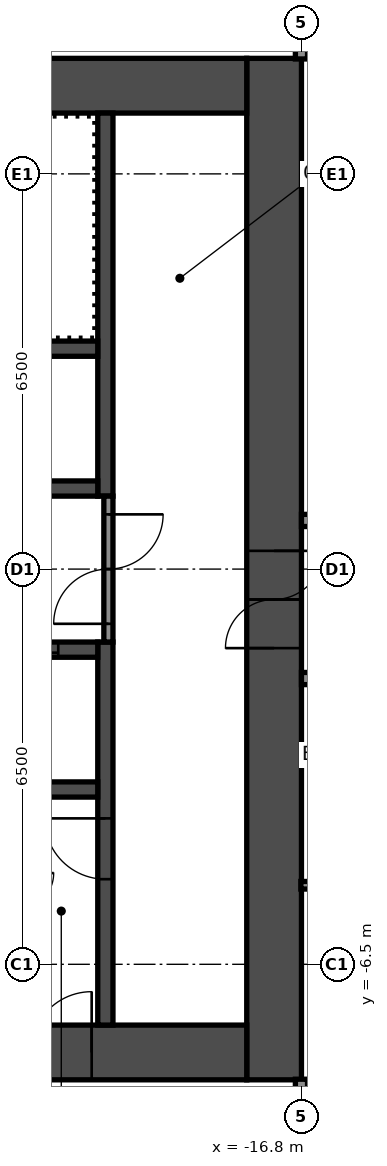
"""IFC4 building model, lengths in metres.
Left out: names, types, materials, properties, quantities, classifications, styles, units other than length and angle.
Written with IfcOpenShell. Run it as: python <this file> out.ifc"""

import sys

from ifc_helpers import new_model, si_unit, direction, frame, frame_2d, origin, place, context, subcontext, project, spatial, rectangle, extrude, element, fill, save


model = new_model("IFC4")
c1 = context("Model", 3, precision=1e-05, world=origin(), true_north=direction((0.0, 1.0)))
c2 = subcontext(c1, "Body", "Model", "MODEL_VIEW")
j1 = project(units=[si_unit("LENGTHUNIT", "METRE"), si_unit("PLANEANGLEUNIT", "RADIAN")], contexts=[c1])
p1 = place(None, origin())
s1 = spatial("IfcSite", under=j1, at=p1, CompositionType="ELEMENT")
p2 = place(p1, origin())
s2 = spatial("IfcBuilding", under=s1, at=p2, CompositionType="ELEMENT")
p3 = place(p2, frame((0.0, 0.0, 169.4)))
s3 = spatial("IfcBuildingStorey", under=s2, at=p3, CompositionType="ELEMENT", Elevation=169.4)
p4 = place(p3, frame((-17.25, -8.4, 0.0), z_axis=(0.0, 0.0, 1.0), x_axis=(0.0, 1.0, 0.0)))
e1 = element("IfcWall", 1, at=p4, inside=s3, PredefinedType="SHEAR", context=c2, shape_type="SweptSolid", body=[
    extrude(rectangle(XDim=16.8, YDim=0.9, at=frame_2d((8.4, 0.0))), origin(), (0.0, 0.0, 1.0), 2.75),
])
p5 = place(p4, frame((7.1, 0.0, 0.0)))
e2 = element("IfcOpeningElement", 2, at=p5, cuts=e1, PredefinedType="OPENING", context=c2, shape_type="SweptSolid", body=[
    extrude(rectangle(XDim=1.6, YDim=2.1, at=frame_2d((0.8, 1.05))), frame((0.0, 0.46, 0.0), z_axis=(0.0, -1.0, 0.0), x_axis=(1.0, 0.0, 0.0)), (0.0, 0.0, 1.0), 0.92),
])
p6 = place(p3, frame((-32.7, 7.95, 0.0), z_axis=(0.0, 0.0, 1.0), x_axis=(1.0, 0.0, 0.0)))
e3 = element("IfcWall", 3, at=p6, inside=s3, PredefinedType="SHEAR", context=c2, shape_type="SweptSolid", body=[
    extrude(rectangle(XDim=15.0, YDim=0.9, at=frame_2d((7.5, 0.0))), origin(), (0.0, 0.0, 1.0), 2.75),
])
p7 = place(p6, frame((3.4, 0.0, 0.0)))
e4 = element("IfcOpeningElement", 4, at=p7, cuts=e3, PredefinedType="OPENING", context=c2, shape_type="SweptSolid", body=[
    extrude(rectangle(XDim=1.2, YDim=2.1, at=frame_2d((0.6, 1.05))), frame((0.0, 0.46, 0.0), z_axis=(0.0, -1.0, 0.0), x_axis=(1.0, 0.0, 0.0)), (0.0, 0.0, 1.0), 0.92),
])
p8 = place(p6, frame((0.75, 0.0, 0.0)))
e5 = element("IfcOpeningElement", 5, at=p8, cuts=e3, PredefinedType="OPENING", context=c2, shape_type="SweptSolid", body=[
    extrude(rectangle(XDim=0.9, YDim=2.1, at=frame_2d((0.45, 1.05))), frame((0.0, 0.46, 0.0), z_axis=(0.0, -1.0, 0.0), x_axis=(1.0, 0.0, 0.0)), (0.0, 0.0, 1.0), 0.92),
])
p9 = place(p3, frame((-32.7, -7.95, 0.0), z_axis=(0.0, 0.0, 1.0), x_axis=(1.0, 0.0, 0.0)))
e6 = element("IfcWall", 6, at=p9, inside=s3, PredefinedType="SHEAR", context=c2, shape_type="SweptSolid", body=[
    extrude(rectangle(XDim=15.0, YDim=0.9, at=frame_2d((7.5, 0.0))), origin(), (0.0, 0.0, 1.0), 2.75),
])
p10 = place(p9, frame((11.45, 0.0, 0.0)))
e7 = element("IfcOpeningElement", 7, at=p10, cuts=e6, PredefinedType="OPENING", context=c2, shape_type="SweptSolid", body=[
    extrude(rectangle(XDim=1.0, YDim=2.1, at=frame_2d((0.5, 1.05))), frame((0.0, 0.46, 0.0), z_axis=(0.0, -1.0, 0.0), x_axis=(1.0, 0.0, 0.0)), (0.0, 0.0, 1.0), 0.92),
])
p11 = place(p3, frame((-20.025, 1.2, 0.0), z_axis=(0.0, 0.0, 1.0), x_axis=(0.0, 1.0, 0.0)))
e8 = element("IfcWall", 8, at=p11, inside=s3, PredefinedType="SHEAR", context=c2, shape_type="SweptSolid", body=[
    extrude(rectangle(XDim=6.3, YDim=0.25, at=frame_2d((3.15, 0.0))), origin(), (0.0, 0.0, 1.0), 2.75),
])
p12 = place(p3, frame((-20.025, -7.5, 0.0), z_axis=(0.0, 0.0, 1.0), x_axis=(0.0, 1.0, 0.0)))
e9 = element("IfcWall", 9, at=p12, inside=s3, PredefinedType="SHEAR", context=c2, shape_type="SweptSolid", body=[
    extrude(rectangle(XDim=6.3, YDim=0.25, at=frame_2d((3.15, 0.0))), origin(), (0.0, 0.0, 1.0), 2.75),
])
p13 = place(p12, frame((2.4, 0.0, 0.0)))
e10 = element("IfcOpeningElement", 10, at=p13, cuts=e9, PredefinedType="OPENING", context=c2, shape_type="SweptSolid", body=[
    extrude(rectangle(XDim=1.0, YDim=2.1, at=frame_2d((0.5, 1.05))), frame((0.0, 0.135, 0.0), z_axis=(0.0, -1.0, 0.0), x_axis=(1.0, 0.0, 0.0)), (0.0, 0.0, 1.0), 0.27),
])
p14 = place(p3, frame((-27.65, 1.325, 0.0), z_axis=(0.0, 0.0, 1.0), x_axis=(1.0, 0.0, 0.0)))
e11 = element("IfcWall", 11, at=p14, inside=s3, PredefinedType="SHEAR", context=c2, shape_type="SweptSolid", body=[
    extrude(rectangle(XDim=7.5, YDim=0.25, at=frame_2d((3.75, 0.0))), origin(), (0.0, 0.0, 1.0), 2.75),
])
p15 = place(p14, frame((4.363, 0.0, 0.0)))
e12 = element("IfcOpeningElement", 12, at=p15, cuts=e11, PredefinedType="OPENING", context=c2, shape_type="SweptSolid", body=[
    extrude(rectangle(XDim=0.9, YDim=2.1, at=frame_2d((0.45, 1.05))), frame((0.0, 0.135, 0.0), z_axis=(0.0, -1.0, 0.0), x_axis=(1.0, 0.0, 0.0)), (0.0, 0.0, 1.0), 0.27),
])
p16 = place(p14, frame((0.663, 0.0, 0.0)))
e13 = element("IfcOpeningElement", 13, at=p16, cuts=e11, PredefinedType="OPENING", context=c2, shape_type="SweptSolid", body=[
    extrude(rectangle(XDim=0.9, YDim=2.1, at=frame_2d((0.45, 1.05))), frame((0.0, 0.135, 0.0), z_axis=(0.0, -1.0, 0.0), x_axis=(1.0, 0.0, 0.0)), (0.0, 0.0, 1.0), 0.27),
])
p17 = place(p3, frame((-27.65, 3.625, 0.0), z_axis=(0.0, 0.0, 1.0), x_axis=(1.0, 0.0, 0.0)))
e14 = element("IfcWall", 14, at=p17, inside=s3, PredefinedType="SHEAR", context=c2, shape_type="SweptSolid", body=[
    extrude(rectangle(XDim=7.5, YDim=0.25, at=frame_2d((3.75, 0.0))), origin(), (0.0, 0.0, 1.0), 2.75),
])
p18 = place(p3, frame((-27.65, -1.325, 0.0), z_axis=(0.0, 0.0, 1.0), x_axis=(1.0, 0.0, 0.0)))
e15 = element("IfcWall", 15, at=p18, inside=s3, PredefinedType="SHEAR", context=c2, shape_type="SweptSolid", body=[
    extrude(rectangle(XDim=7.5, YDim=0.25, at=frame_2d((3.75, 0.0))), origin(), (0.0, 0.0, 1.0), 2.75),
])
p19 = place(p18, frame((5.75, 0.0, 0.0)))
e16 = element("IfcOpeningElement", 16, at=p19, cuts=e15, PredefinedType="OPENING", context=c2, shape_type="SweptSolid", body=[
    extrude(rectangle(XDim=1.1, YDim=2.1, at=frame_2d((0.55, 1.05))), frame((0.0, 0.135, 0.0), z_axis=(0.0, -1.0, 0.0), x_axis=(1.0, 0.0, 0.0)), (0.0, 0.0, 1.0), 0.27),
])
p20 = place(p18, frame((3.35, 0.0, 0.0)))
e17 = element("IfcOpeningElement", 17, at=p20, cuts=e15, PredefinedType="OPENING", context=c2, shape_type="SweptSolid", body=[
    extrude(rectangle(XDim=1.1, YDim=2.1, at=frame_2d((0.55, 1.05))), frame((0.0, 0.135, 0.0), z_axis=(0.0, -1.0, 0.0), x_axis=(1.0, 0.0, 0.0)), (0.0, 0.0, 1.0), 0.27),
])
p21 = place(p18, frame((0.95, 0.0, 0.0)))
e18 = element("IfcOpeningElement", 18, at=p21, cuts=e15, PredefinedType="OPENING", context=c2, shape_type="SweptSolid", body=[
    extrude(rectangle(XDim=1.1, YDim=2.1, at=frame_2d((0.55, 1.05))), frame((0.0, 0.135, 0.0), z_axis=(0.0, -1.0, 0.0), x_axis=(1.0, 0.0, 0.0)), (0.0, 0.0, 1.0), 0.27),
])
p22 = place(p3, frame((-27.65, -3.625, 0.0), z_axis=(0.0, 0.0, 1.0), x_axis=(1.0, 0.0, 0.0)))
e19 = element("IfcWall", 19, at=p22, inside=s3, PredefinedType="SHEAR", context=c2, shape_type="SweptSolid", body=[
    extrude(rectangle(XDim=7.5, YDim=0.25, at=frame_2d((3.75, 0.0))), origin(), (0.0, 0.0, 1.0), 2.75),
])
p23 = place(p3, frame((-19.975, -1.2, 0.0), z_axis=(0.0, 0.0, 1.0), x_axis=(0.0, 1.0, 0.0)))
e20 = element("IfcWall", 20, at=p23, inside=s3, PredefinedType="PARTITIONING", context=c2, shape_type="SweptSolid", body=[
    extrude(rectangle(XDim=2.4, YDim=0.15, at=frame_2d((1.2, 0.0))), origin(), (0.0, 0.0, 1.0), 2.75),
])
p24 = place(p23, frame((0.3, 0.0, 0.0)))
e21 = element("IfcOpeningElement", 21, at=p24, cuts=e20, PredefinedType="OPENING", context=c2, shape_type="SweptSolid", body=[
    extrude(rectangle(XDim=1.8, YDim=2.1, at=frame_2d((0.9, 1.05))), frame((0.0, 0.085, 0.0), z_axis=(0.0, -1.0, 0.0), x_axis=(1.0, 0.0, 0.0)), (0.0, 0.0, 1.0), 0.17),
])
p25 = place(p3, frame((-16.81, -5.2, 0.0), z_axis=(0.0, 0.0, 1.0), x_axis=(1.0, 0.0, 0.0)))
e22 = element("IfcWall", 22, at=p25, inside=s3, PredefinedType="PARTITIONING", context=c2, shape_type="SweptSolid", body=[
    extrude(rectangle(XDim=3.348, YDim=0.125, at=frame_2d((1.674, 0.0))), origin(), (0.0, 0.0, 1.0), 2.75),
])
p26 = place(p25, frame((1.31, 0.0, 0.0)))
e23 = element("IfcOpeningElement", 23, at=p26, cuts=e22, PredefinedType="OPENING", context=c2, shape_type="SweptSolid", body=[
    extrude(rectangle(XDim=0.8, YDim=2.1, at=frame_2d((0.4, 1.05))), frame((0.0, 0.073, 0.0), z_axis=(0.0, -1.0, 0.0), x_axis=(1.0, 0.0, 0.0)), (0.0, 0.0, 1.0), 0.145),
])
p27 = place(p3, frame((-16.8, -1.8, 0.0), z_axis=(0.0, 0.0, 1.0), x_axis=(1.0, 0.0, 0.0)))
e24 = element("IfcWall", 24, at=p27, inside=s3, PredefinedType="PARTITIONING", context=c2, shape_type="SweptSolid", body=[
    extrude(rectangle(XDim=33.6, YDim=0.2, at=frame_2d((16.8, 0.0))), origin(), (0.0, 0.0, 1.0), 2.75),
])
p28 = place(p27, frame((5.4, 0.0, 0.0)))
e25 = element("IfcOpeningElement", 25, at=p28, cuts=e24, PredefinedType="OPENING", context=c2, shape_type="SweptSolid", body=[
    extrude(rectangle(XDim=1.0, YDim=2.1, at=frame_2d((0.5, 1.05))), frame((0.0, 0.11, 0.0), z_axis=(0.0, -1.0, 0.0), x_axis=(1.0, 0.0, 0.0)), (0.0, 0.0, 1.0), 0.22),
])
p29 = place(p27, frame((11.25, 0.0, 0.0)))
e26 = element("IfcOpeningElement", 26, at=p29, cuts=e24, PredefinedType="OPENING", context=c2, shape_type="SweptSolid", body=[
    extrude(rectangle(XDim=1.0, YDim=2.1, at=frame_2d((0.5, 1.05))), frame((0.0, 0.11, 0.0), z_axis=(0.0, -1.0, 0.0), x_axis=(1.0, 0.0, 0.0)), (0.0, 0.0, 1.0), 0.22),
])
p30 = place(p27, frame((12.95, 0.0, 0.0)))
e27 = element("IfcOpeningElement", 27, at=p30, cuts=e24, PredefinedType="OPENING", context=c2, shape_type="SweptSolid", body=[
    extrude(rectangle(XDim=1.0, YDim=2.1, at=frame_2d((0.5, 1.05))), frame((0.0, 0.11, 0.0), z_axis=(0.0, -1.0, 0.0), x_axis=(1.0, 0.0, 0.0)), (0.0, 0.0, 1.0), 0.22),
])
p31 = place(p27, frame((18.785, 0.0, 0.0)))
e28 = element("IfcOpeningElement", 28, at=p31, cuts=e24, PredefinedType="OPENING", context=c2, shape_type="SweptSolid", body=[
    extrude(rectangle(XDim=0.9, YDim=2.1, at=frame_2d((0.45, 1.05))), frame((0.0, 0.11, 0.0), z_axis=(0.0, -1.0, 0.0), x_axis=(1.0, 0.0, 0.0)), (0.0, 0.0, 1.0), 0.22),
])
p32 = place(p27, frame((22.985, 0.0, 0.0)))
e29 = element("IfcOpeningElement", 29, at=p32, cuts=e24, PredefinedType="OPENING", context=c2, shape_type="SweptSolid", body=[
    extrude(rectangle(XDim=0.9, YDim=2.1, at=frame_2d((0.45, 1.05))), frame((0.0, 0.11, 0.0), z_axis=(0.0, -1.0, 0.0), x_axis=(1.0, 0.0, 0.0)), (0.0, 0.0, 1.0), 0.22),
])
p33 = place(p27, frame((28.05, 0.0, 0.0)))
e30 = element("IfcOpeningElement", 30, at=p33, cuts=e24, PredefinedType="OPENING", context=c2, shape_type="SweptSolid", body=[
    extrude(rectangle(XDim=1.0, YDim=2.1, at=frame_2d((0.5, 1.05))), frame((0.0, 0.11, 0.0), z_axis=(0.0, -1.0, 0.0), x_axis=(1.0, 0.0, 0.0)), (0.0, 0.0, 1.0), 0.22),
])
p34 = place(p27, frame((29.75, 0.0, 0.0)))
e31 = element("IfcOpeningElement", 31, at=p34, cuts=e24, PredefinedType="OPENING", context=c2, shape_type="SweptSolid", body=[
    extrude(rectangle(XDim=1.0, YDim=2.1, at=frame_2d((0.5, 1.05))), frame((0.0, 0.11, 0.0), z_axis=(0.0, -1.0, 0.0), x_axis=(1.0, 0.0, 0.0)), (0.0, 0.0, 1.0), 0.22),
])
p35 = place(p3, frame((-16.8, 0.8, 0.0), z_axis=(0.0, 0.0, 1.0), x_axis=(1.0, 0.0, 0.0)))
e32 = element("IfcWall", 32, at=p35, inside=s3, PredefinedType="PARTITIONING", context=c2, shape_type="SweptSolid", body=[
    extrude(rectangle(XDim=33.6, YDim=0.2, at=frame_2d((16.8, 0.0))), origin(), (0.0, 0.0, 1.0), 2.75),
])
p36 = place(p35, frame((2.0, 0.0, 0.0)))
e33 = element("IfcOpeningElement", 33, at=p36, cuts=e32, PredefinedType="OPENING", context=c2, shape_type="SweptSolid", body=[
    extrude(rectangle(XDim=1.0, YDim=2.1, at=frame_2d((0.5, 1.05))), frame((0.0, 0.11, 0.0), z_axis=(0.0, -1.0, 0.0), x_axis=(1.0, 0.0, 0.0)), (0.0, 0.0, 1.0), 0.22),
])
p37 = place(p35, frame((11.25, 0.0, 0.0)))
e34 = element("IfcOpeningElement", 34, at=p37, cuts=e32, PredefinedType="OPENING", context=c2, shape_type="SweptSolid", body=[
    extrude(rectangle(XDim=1.0, YDim=2.1, at=frame_2d((0.5, 1.05))), frame((0.0, 0.11, 0.0), z_axis=(0.0, -1.0, 0.0), x_axis=(1.0, 0.0, 0.0)), (0.0, 0.0, 1.0), 0.22),
])
p38 = place(p35, frame((12.95, 0.0, 0.0)))
e35 = element("IfcOpeningElement", 35, at=p38, cuts=e32, PredefinedType="OPENING", context=c2, shape_type="SweptSolid", body=[
    extrude(rectangle(XDim=1.0, YDim=2.1, at=frame_2d((0.5, 1.05))), frame((0.0, 0.11, 0.0), z_axis=(0.0, -1.0, 0.0), x_axis=(1.0, 0.0, 0.0)), (0.0, 0.0, 1.0), 0.22),
])
p39 = place(p35, frame((19.04, 0.0, 0.0)))
e36 = element("IfcOpeningElement", 36, at=p39, cuts=e32, PredefinedType="OPENING", context=c2, shape_type="SweptSolid", body=[
    extrude(rectangle(XDim=0.9, YDim=2.1, at=frame_2d((0.45, 1.05))), frame((0.0, 0.11, 0.0), z_axis=(0.0, -1.0, 0.0), x_axis=(1.0, 0.0, 0.0)), (0.0, 0.0, 1.0), 0.22),
])
p40 = place(p35, frame((23.24, 0.0, 0.0)))
e37 = element("IfcOpeningElement", 37, at=p40, cuts=e32, PredefinedType="OPENING", context=c2, shape_type="SweptSolid", body=[
    extrude(rectangle(XDim=0.9, YDim=2.1, at=frame_2d((0.45, 1.05))), frame((0.0, 0.11, 0.0), z_axis=(0.0, -1.0, 0.0), x_axis=(1.0, 0.0, 0.0)), (0.0, 0.0, 1.0), 0.22),
])
p41 = place(p35, frame((28.05, 0.0, 0.0)))
e38 = element("IfcOpeningElement", 38, at=p41, cuts=e32, PredefinedType="OPENING", context=c2, shape_type="SweptSolid", body=[
    extrude(rectangle(XDim=1.0, YDim=2.1, at=frame_2d((0.5, 1.05))), frame((0.0, 0.11, 0.0), z_axis=(0.0, -1.0, 0.0), x_axis=(1.0, 0.0, 0.0)), (0.0, 0.0, 1.0), 0.22),
])
p42 = place(p35, frame((29.75, 0.0, 0.0)))
e39 = element("IfcOpeningElement", 39, at=p42, cuts=e32, PredefinedType="OPENING", context=c2, shape_type="SweptSolid", body=[
    extrude(rectangle(XDim=1.0, YDim=2.1, at=frame_2d((0.5, 1.05))), frame((0.0, 0.11, 0.0), z_axis=(0.0, -1.0, 0.0), x_axis=(1.0, 0.0, 0.0)), (0.0, 0.0, 1.0), 0.22),
])
p43 = place(p3, frame((-16.8, -19.3, 0.0), z_axis=(0.0, 0.0, 1.0), x_axis=(0.0, 1.0, 0.0)))
e40 = element("IfcWall", 40, at=p43, inside=s3, PredefinedType="PARTITIONING", context=c2, shape_type="SweptSolid", body=[
    extrude(rectangle(XDim=10.91, YDim=0.2, at=frame_2d((5.455, 0.0))), origin(), (0.0, 0.0, 1.0), 2.75),
])
p44 = place(p3, frame((-16.8, 8.39, 0.0), z_axis=(0.0, 0.0, 1.0), x_axis=(0.0, 1.0, 0.0)))
e41 = element("IfcWall", 41, at=p44, inside=s3, PredefinedType="PARTITIONING", context=c2, shape_type="SweptSolid", body=[
    extrude(rectangle(XDim=9.91, YDim=0.2, at=frame_2d((4.955, 0.0))), origin(), (0.0, 0.0, 1.0), 2.75),
])
p45 = place(p5, origin())
e42 = element("IfcDoor", 42, at=p45, inside=s3, OperationType="DOUBLE_DOOR_SINGLE_SWING", PredefinedType="DOOR", context=c2, shape_type="SweptSolid", body=[
    extrude(rectangle(XDim=1.6, YDim=2.1, at=frame_2d((0.8, 1.05))), frame((0.0, 0.025, 0.0), z_axis=(0.0, -1.0, 0.0), x_axis=(1.0, 0.0, 0.0)), (0.0, 0.0, 1.0), 0.05),
])
fill(e2, e42)
p46 = place(p10, origin())
e43 = element("IfcDoor", 43, at=p46, inside=s3, OperationType="SINGLE_SWING_LEFT", PredefinedType="DOOR", context=c2, shape_type="SweptSolid", body=[
    extrude(rectangle(XDim=1.0, YDim=2.1, at=frame_2d((0.5, 1.05))), frame((0.0, 0.025, 0.0), z_axis=(0.0, -1.0, 0.0), x_axis=(1.0, 0.0, 0.0)), (0.0, 0.0, 1.0), 0.05),
])
fill(e7, e43)
p47 = place(p13, origin())
e44 = element("IfcDoor", 44, at=p47, inside=s3, OperationType="SINGLE_SWING_LEFT", PredefinedType="DOOR", context=c2, shape_type="SweptSolid", body=[
    extrude(rectangle(XDim=1.0, YDim=2.1, at=frame_2d((0.5, 1.05))), frame((0.0, 0.025, 0.0), z_axis=(0.0, -1.0, 0.0), x_axis=(1.0, 0.0, 0.0)), (0.0, 0.0, 1.0), 0.05),
])
fill(e10, e44)
p48 = place(p24, origin())
e45 = element("IfcDoor", 45, at=p48, inside=s3, OperationType="DOUBLE_DOOR_SINGLE_SWING", PredefinedType="DOOR", context=c2, shape_type="SweptSolid", body=[
    extrude(rectangle(XDim=1.8, YDim=2.1, at=frame_2d((0.9, 1.05))), frame((0.0, 0.025, 0.0), z_axis=(0.0, -1.0, 0.0), x_axis=(1.0, 0.0, 0.0)), (0.0, 0.0, 1.0), 0.05),
])
fill(e21, e45)
p49 = place(p19, origin())
e46 = element("IfcDoor", 46, at=p49, inside=s3, OperationType="DOUBLE_DOOR_SLIDING", PredefinedType="DOOR", context=c2, shape_type="SweptSolid", body=[
    extrude(rectangle(XDim=1.1, YDim=2.1, at=frame_2d((0.55, 1.05))), frame((0.0, 0.025, 0.0), z_axis=(0.0, -1.0, 0.0), x_axis=(1.0, 0.0, 0.0)), (0.0, 0.0, 1.0), 0.05),
])
fill(e16, e46)
save(model, sys.argv[1])
